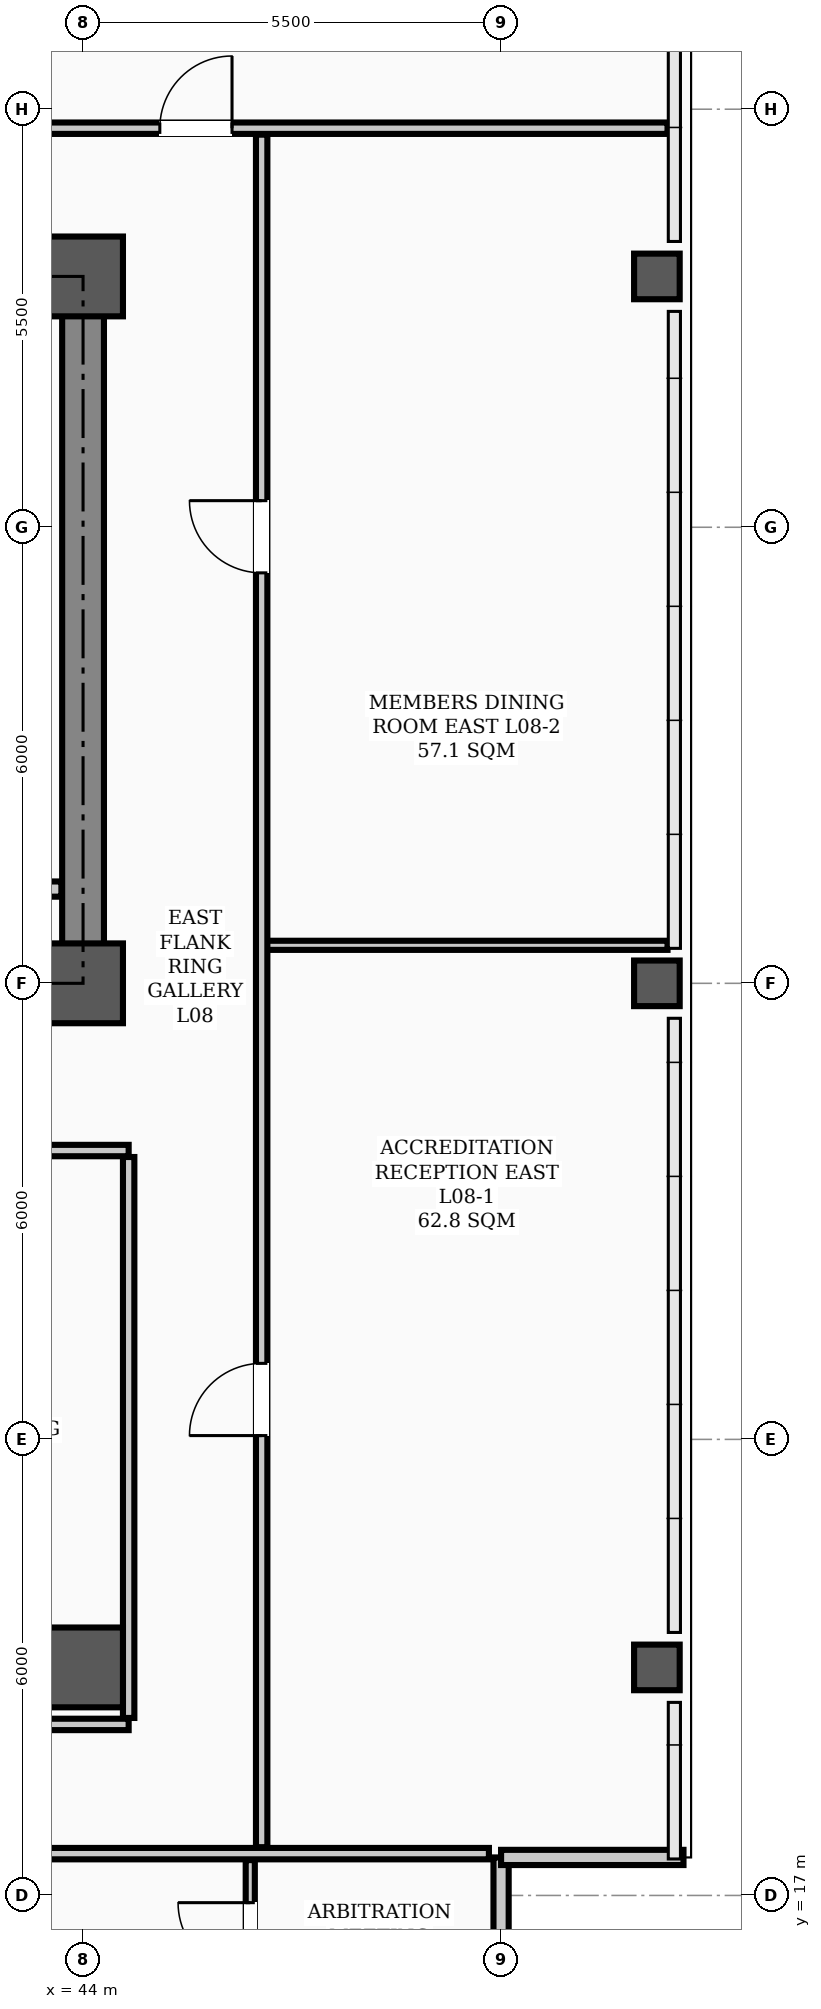
"""IFC4 building model, lengths in metres.
Left out: names, types, materials, properties, quantities, classifications, styles, units other than length and angle.
Written with IfcOpenShell. Run it as: python <this file> out.ifc"""

import sys

from ifc_helpers import new_model, si_unit, direction, frame, frame_2d, origin, origin_2d, place, context, subcontext, project, spatial, rectangle, hollow_rectangle, extrude, element, fill, save


model = new_model("IFC4")
c1 = context("Model", 3, precision=1e-05, world=origin(), true_north=direction((0.0, 1.0)))
c2 = subcontext(c1, "Body", "Model", "MODEL_VIEW")
j1 = project(units=[si_unit("LENGTHUNIT", "METRE"), si_unit("PLANEANGLEUNIT", "RADIAN")], contexts=[c1])
p1 = place(None, origin())
s1 = spatial("IfcSite", under=j1, at=p1, CompositionType="ELEMENT")
p2 = place(p1, origin())
s2 = spatial("IfcBuilding", under=s1, at=p2, CompositionType="ELEMENT")
p3 = place(p2, frame((0.0, 0.0, 34.3)))
s3 = spatial("IfcBuildingStorey", under=s2, at=p3, CompositionType="ELEMENT", Elevation=34.3)
for number, where, z_axis, x_axis in (
    (1, (44.0, 29.0, 0.0), (0.0, 0.0, 1.0), (1.0, 0.0, 0.0)),
    (2, (44.0, 38.3, 0.0), (0.0, 0.0, 1.0), (1.0, 0.0, 0.0)),
    (3, (44.0, 20.0, 0.0), (0.0, 0.0, 1.0), (1.0, 0.0, 0.0)),
):
    element("IfcColumn", number, at=place(p3, frame(where, z_axis=z_axis, x_axis=x_axis)), inside=s3, PredefinedType="COLUMN", context=c2, shape_type="SweptSolid", body=[
        extrude(hollow_rectangle(XDim=1.05, YDim=1.05, WallThickness=0.038, InnerFilletRadius=0.019, OuterFilletRadius=0.057, at=origin_2d()), origin(), (0.0, 0.0, 1.0), 3.9),
    ])
for number, where, z_axis, x_axis in (
    (4, (51.55, 20.0, 0.0), (0.0, 0.0, 1.0), (1.0, 0.0, 0.0)),
    (5, (51.55, 29.0, 0.0), (0.0, 0.0, 1.0), (1.0, 0.0, 0.0)),
    (6, (51.55, 38.3, 0.0), (0.0, 0.0, 1.0), (1.0, 0.0, 0.0)),
):
    element("IfcColumn", number, at=place(p3, frame(where, z_axis=z_axis, x_axis=x_axis)), inside=s3, PredefinedType="COLUMN", context=c2, shape_type="SweptSolid", body=[
        extrude(hollow_rectangle(XDim=0.6, YDim=0.6, WallThickness=0.026, InnerFilletRadius=0.013, OuterFilletRadius=0.039, at=origin_2d()), origin(), (0.0, 0.0, 1.0), 3.9),
    ])
for number, where, z_axis, x_axis in (
    (7, (49.5, 15.1, 0.0), (0.0, 0.0, 1.0), (0.0, 1.0, 0.0)),
    (8, (49.5, 17.5, 0.0), (0.0, 0.0, 1.0), (1.0, 0.0, 0.0)),
):
    element("IfcWall", number, at=place(p3, frame(where, z_axis=z_axis, x_axis=x_axis)), inside=s3, PredefinedType="PARAPET", context=c2, shape_type="SweptSolid", body=[
        extrude(rectangle(XDim=2.4, YDim=0.2, at=frame_2d((1.2, 0.0))), origin(), (0.0, 0.0, 1.0), 1.2),
    ])
p4 = place(p3, frame((13.5, 29.0, 0.0), z_axis=(0.0, 0.0, 1.0), x_axis=(1.0, 0.0, 0.0)))
e9 = element("IfcWall", 9, at=p4, inside=s3, PredefinedType="SHEAR", context=c2, shape_type="SweptSolid", body=[
    extrude(rectangle(XDim=30.5, YDim=0.55, at=frame_2d((15.25, 0.0))), origin(), (0.0, 0.0, 1.0), 3.72),
])
p5 = place(p4, frame((1.75, 0.0, 0.0)))
e10 = element("IfcOpeningElement", 10, at=p5, cuts=e9, PredefinedType="OPENING", context=c2, shape_type="SweptSolid", body=[
    extrude(rectangle(XDim=1.1, YDim=2.08, at=frame_2d((0.55, 1.04))), frame((0.0, 0.285, 0.0), z_axis=(0.0, -1.0, 0.0), x_axis=(1.0, 0.0, 0.0)), (0.0, 0.0, 1.0), 0.57),
])
p6 = place(p4, frame((26.7, 0.0, 0.0)))
e11 = element("IfcOpeningElement", 11, at=p6, cuts=e9, PredefinedType="OPENING", context=c2, shape_type="SweptSolid", body=[
    extrude(rectangle(XDim=1.1, YDim=2.08, at=frame_2d((0.55, 1.04))), frame((0.0, 0.285, 0.0), z_axis=(0.0, -1.0, 0.0), x_axis=(1.0, 0.0, 0.0)), (0.0, 0.0, 1.0), 0.57),
])
p7 = place(p4, frame((6.8, 0.0, 0.0)))
e12 = element("IfcOpeningElement", 12, at=p7, cuts=e9, PredefinedType="OPENING", context=c2, shape_type="SweptSolid", body=[
    extrude(rectangle(XDim=1.1, YDim=2.08, at=frame_2d((0.55, 1.04))), frame((0.0, 0.285, 0.0), z_axis=(0.0, -1.0, 0.0), x_axis=(1.0, 0.0, 0.0)), (0.0, 0.0, 1.0), 0.57),
])
p8 = place(p4, frame((13.2, 0.0, 0.0)))
e13 = element("IfcOpeningElement", 13, at=p8, cuts=e9, PredefinedType="OPENING", context=c2, shape_type="SweptSolid", body=[
    extrude(rectangle(XDim=1.6, YDim=2.08, at=frame_2d((0.8, 1.04))), frame((0.0, 0.285, 0.0), z_axis=(0.0, -1.0, 0.0), x_axis=(1.0, 0.0, 0.0)), (0.0, 0.0, 1.0), 0.57),
])
p9 = place(p4, frame((19.53, 0.0, 0.0)))
e14 = element("IfcOpeningElement", 14, at=p9, cuts=e9, PredefinedType="OPENING", context=c2, shape_type="SweptSolid", body=[
    extrude(rectangle(XDim=0.9, YDim=2.08, at=frame_2d((0.45, 1.04))), frame((0.0, 0.285, 0.0), z_axis=(0.0, -1.0, 0.0), x_axis=(1.0, 0.0, 0.0)), (0.0, 0.0, 1.0), 0.57),
])
p10 = place(p4, frame((21.57, 0.0, 0.0)))
e15 = element("IfcOpeningElement", 15, at=p10, cuts=e9, PredefinedType="OPENING", context=c2, shape_type="SweptSolid", body=[
    extrude(rectangle(XDim=0.9, YDim=2.08, at=frame_2d((0.45, 1.04))), frame((0.0, 0.285, 0.0), z_axis=(0.0, -1.0, 0.0), x_axis=(1.0, 0.0, 0.0)), (0.0, 0.0, 1.0), 0.57),
])
p11 = place(p3, frame((13.5, 38.3, 0.0), z_axis=(0.0, 0.0, 1.0), x_axis=(1.0, 0.0, 0.0)))
e16 = element("IfcWall", 16, at=p11, inside=s3, PredefinedType="SHEAR", context=c2, shape_type="SweptSolid", body=[
    extrude(rectangle(XDim=30.5, YDim=0.55, at=frame_2d((15.25, 0.0))), origin(), (0.0, 0.0, 1.0), 3.72),
])
p12 = place(p3, frame((44.0, 29.35, 0.0), z_axis=(0.0, 0.0, 1.0), x_axis=(0.0, 1.0, 0.0)))
e17 = element("IfcWall", 17, at=p12, inside=s3, PredefinedType="SHEAR", context=c2, shape_type="SweptSolid", body=[
    extrude(rectangle(XDim=8.6, YDim=0.55, at=frame_2d((4.3, 0.0))), origin(), (0.0, 0.0, 1.0), 3.72),
])
p13 = place(p3, frame((42.4, 30.24, 0.0), z_axis=(0.0, 0.0, 1.0), x_axis=(1.0, 0.0, 0.0)))
e18 = element("IfcWall", 18, at=p13, inside=s3, PredefinedType="STANDARD", context=c2, shape_type="SweptSolid", body=[
    extrude(rectangle(XDim=1.315, YDim=0.2, at=frame_2d((0.658, 0.0))), origin(), (0.0, 0.0, 1.0), 3.1),
])
p14 = place(p3, frame((12.9, 26.8, 0.0), z_axis=(0.0, 0.0, 1.0), x_axis=(1.0, 0.0, 0.0)))
e19 = element("IfcWall", 19, at=p14, inside=s3, PredefinedType="PARTITIONING", context=c2, shape_type="SweptSolid", body=[
    extrude(rectangle(XDim=31.7, YDim=0.15, at=frame_2d((15.85, 0.0))), origin(), (0.0, 0.0, 1.0), 3.1),
])
p15 = place(p14, frame((13.6, 0.0, 0.0)))
e20 = element("IfcOpeningElement", 20, at=p15, cuts=e19, PredefinedType="OPENING", context=c2, shape_type="SweptSolid", body=[
    extrude(rectangle(XDim=1.6, YDim=2.08, at=frame_2d((0.8, 1.04))), frame((0.0, 0.085, 0.0), z_axis=(0.0, -1.0, 0.0), x_axis=(1.0, 0.0, 0.0)), (0.0, 0.0, 1.0), 0.17),
])
p16 = place(p14, frame((2.875, 0.0, 0.0)))
e21 = element("IfcOpeningElement", 21, at=p16, cuts=e19, PredefinedType="OPENING", context=c2, shape_type="SweptSolid", body=[
    extrude(rectangle(XDim=0.95, YDim=2.08, at=frame_2d((0.475, 1.04))), frame((0.0, 0.085, 0.0), z_axis=(0.0, -1.0, 0.0), x_axis=(1.0, 0.0, 0.0)), (0.0, 0.0, 1.0), 0.17),
])
p17 = place(p14, frame((8.625, 0.0, 0.0)))
e22 = element("IfcOpeningElement", 22, at=p17, cuts=e19, PredefinedType="OPENING", context=c2, shape_type="SweptSolid", body=[
    extrude(rectangle(XDim=0.95, YDim=2.08, at=frame_2d((0.475, 1.04))), frame((0.0, 0.085, 0.0), z_axis=(0.0, -1.0, 0.0), x_axis=(1.0, 0.0, 0.0)), (0.0, 0.0, 1.0), 0.17),
])
p18 = place(p14, frame((16.075, 0.0, 0.0)))
e23 = element("IfcOpeningElement", 23, at=p18, cuts=e19, PredefinedType="OPENING", context=c2, shape_type="SweptSolid", body=[
    extrude(rectangle(XDim=0.95, YDim=2.08, at=frame_2d((0.475, 1.04))), frame((0.0, 0.085, 0.0), z_axis=(0.0, -1.0, 0.0), x_axis=(1.0, 0.0, 0.0)), (0.0, 0.0, 1.0), 0.17),
])
p19 = place(p14, frame((21.875, 0.0, 0.0)))
e24 = element("IfcOpeningElement", 24, at=p19, cuts=e19, PredefinedType="OPENING", context=c2, shape_type="SweptSolid", body=[
    extrude(rectangle(XDim=0.95, YDim=2.08, at=frame_2d((0.475, 1.04))), frame((0.0, 0.085, 0.0), z_axis=(0.0, -1.0, 0.0), x_axis=(1.0, 0.0, 0.0)), (0.0, 0.0, 1.0), 0.17),
])
p20 = place(p14, frame((29.025, 0.0, 0.0)))
e25 = element("IfcOpeningElement", 25, at=p20, cuts=e19, PredefinedType="OPENING", context=c2, shape_type="SweptSolid", body=[
    extrude(rectangle(XDim=0.95, YDim=2.08, at=frame_2d((0.475, 1.04))), frame((0.0, 0.085, 0.0), z_axis=(0.0, -1.0, 0.0), x_axis=(1.0, 0.0, 0.0)), (0.0, 0.0, 1.0), 0.17),
])
p21 = place(p3, frame((4.66, 17.55, 0.0), z_axis=(0.0, 0.0, 1.0), x_axis=(1.0, 0.0, 0.0)))
e26 = element("IfcWall", 26, at=p21, inside=s3, PredefinedType="PARTITIONING", context=c2, shape_type="SweptSolid", body=[
    extrude(rectangle(XDim=44.68, YDim=0.15, at=frame_2d((22.34, 0.0))), origin(), (0.0, 0.0, 1.0), 3.1),
])
p22 = place(p21, frame((7.34, 0.0, 0.0)))
e27 = element("IfcOpeningElement", 27, at=p22, cuts=e26, PredefinedType="OPENING", context=c2, shape_type="SweptSolid", body=[
    extrude(rectangle(XDim=0.95, YDim=2.08, at=frame_2d((0.475, 1.04))), frame((0.0, 0.085, 0.0), z_axis=(0.0, -1.0, 0.0), x_axis=(1.0, 0.0, 0.0)), (0.0, 0.0, 1.0), 0.17),
])
p23 = place(p21, frame((12.465, 0.0, 0.0)))
e28 = element("IfcOpeningElement", 28, at=p23, cuts=e26, PredefinedType="OPENING", context=c2, shape_type="SweptSolid", body=[
    extrude(rectangle(XDim=0.95, YDim=2.08, at=frame_2d((0.475, 1.04))), frame((0.0, 0.085, 0.0), z_axis=(0.0, -1.0, 0.0), x_axis=(1.0, 0.0, 0.0)), (0.0, 0.0, 1.0), 0.17),
])
p24 = place(p21, frame((29.265, 0.0, 0.0)))
e29 = element("IfcOpeningElement", 29, at=p24, cuts=e26, PredefinedType="OPENING", context=c2, shape_type="SweptSolid", body=[
    extrude(rectangle(XDim=0.95, YDim=2.08, at=frame_2d((0.475, 1.04))), frame((0.0, 0.085, 0.0), z_axis=(0.0, -1.0, 0.0), x_axis=(1.0, 0.0, 0.0)), (0.0, 0.0, 1.0), 0.17),
])
p25 = place(p21, frame((37.265, 0.0, 0.0)))
e30 = element("IfcOpeningElement", 30, at=p25, cuts=e26, PredefinedType="OPENING", context=c2, shape_type="SweptSolid", body=[
    extrude(rectangle(XDim=0.95, YDim=2.08, at=frame_2d((0.475, 1.04))), frame((0.0, 0.085, 0.0), z_axis=(0.0, -1.0, 0.0), x_axis=(1.0, 0.0, 0.0)), (0.0, 0.0, 1.0), 0.17),
])
p26 = place(p3, frame((28.4, 19.25, 0.0), z_axis=(0.0, 0.0, 1.0), x_axis=(1.0, 0.0, 0.0)))
e31 = element("IfcWall", 31, at=p26, inside=s3, PredefinedType="PARTITIONING", context=c2, shape_type="SweptSolid", body=[
    extrude(rectangle(XDim=16.2, YDim=0.15, at=frame_2d((8.1, 0.0))), origin(), (0.0, 0.0, 1.0), 3.1),
])
p27 = place(p3, frame((46.35, 29.5, 0.0), z_axis=(0.0, 0.0, 1.0), x_axis=(1.0, 0.0, 0.0)))
e32 = element("IfcWall", 32, at=p27, inside=s3, PredefinedType="PARTITIONING", context=c2, shape_type="SweptSolid", body=[
    extrude(rectangle(XDim=5.34, YDim=0.12, at=frame_2d((2.67, 0.0))), origin(), (0.0, 0.0, 1.0), 3.0),
])
p28 = place(p3, frame((2.31, 40.25, 0.0), z_axis=(0.0, 0.0, 1.0), x_axis=(1.0, 0.0, 0.0)))
e33 = element("IfcWall", 33, at=p28, inside=s3, PredefinedType="PARTITIONING", context=c2, shape_type="SweptSolid", body=[
    extrude(rectangle(XDim=49.38, YDim=0.15, at=frame_2d((24.69, 0.0))), origin(), (0.0, 0.0, 1.0), 3.1),
])
p29 = place(p28, frame((9.23, 0.0, 0.0)))
e34 = element("IfcOpeningElement", 34, at=p29, cuts=e33, PredefinedType="OPENING", context=c2, shape_type="SweptSolid", body=[
    extrude(rectangle(XDim=0.95, YDim=2.08, at=frame_2d((0.475, 1.04))), frame((0.0, 0.085, 0.0), z_axis=(0.0, -1.0, 0.0), x_axis=(1.0, 0.0, 0.0)), (0.0, 0.0, 1.0), 0.17),
])
p30 = place(p28, frame((23.115, 0.0, 0.0)))
e35 = element("IfcOpeningElement", 35, at=p30, cuts=e33, PredefinedType="OPENING", context=c2, shape_type="SweptSolid", body=[
    extrude(rectangle(XDim=0.95, YDim=2.08, at=frame_2d((0.475, 1.04))), frame((0.0, 0.085, 0.0), z_axis=(0.0, -1.0, 0.0), x_axis=(1.0, 0.0, 0.0)), (0.0, 0.0, 1.0), 0.17),
])
p31 = place(p28, frame((31.515, 0.0, 0.0)))
e36 = element("IfcOpeningElement", 36, at=p31, cuts=e33, PredefinedType="OPENING", context=c2, shape_type="SweptSolid", body=[
    extrude(rectangle(XDim=0.95, YDim=2.08, at=frame_2d((0.475, 1.04))), frame((0.0, 0.085, 0.0), z_axis=(0.0, -1.0, 0.0), x_axis=(1.0, 0.0, 0.0)), (0.0, 0.0, 1.0), 0.17),
])
p32 = place(p28, frame((42.7, 0.0, 0.0)))
e37 = element("IfcOpeningElement", 37, at=p32, cuts=e33, PredefinedType="OPENING", context=c2, shape_type="SweptSolid", body=[
    extrude(rectangle(XDim=0.95, YDim=2.08, at=frame_2d((0.475, 1.04))), frame((0.0, 0.085, 0.0), z_axis=(0.0, -1.0, 0.0), x_axis=(1.0, 0.0, 0.0)), (0.0, 0.0, 1.0), 0.17),
])
p33 = place(p3, frame((46.35, 17.635, 0.0), z_axis=(0.0, 0.0, 1.0), x_axis=(0.0, 1.0, 0.0)))
e38 = element("IfcWall", 38, at=p33, inside=s3, PredefinedType="PARTITIONING", context=c2, shape_type="SweptSolid", body=[
    extrude(rectangle(XDim=22.53, YDim=0.15, at=frame_2d((11.265, 0.0))), origin(), (0.0, 0.0, 1.0), 3.0),
])
p34 = place(p33, frame((5.415, 0.0, 0.0)))
e39 = element("IfcOpeningElement", 39, at=p34, cuts=e38, PredefinedType="OPENING", context=c2, shape_type="SweptSolid", body=[
    extrude(rectangle(XDim=0.95, YDim=2.08, at=frame_2d((0.475, 1.04))), frame((0.0, 0.085, 0.0), z_axis=(0.0, -1.0, 0.0), x_axis=(1.0, 0.0, 0.0)), (0.0, 0.0, 1.0), 0.17),
])
p35 = place(p33, frame((16.765, 0.0, 0.0)))
e40 = element("IfcOpeningElement", 40, at=p35, cuts=e38, PredefinedType="OPENING", context=c2, shape_type="SweptSolid", body=[
    extrude(rectangle(XDim=0.95, YDim=2.08, at=frame_2d((0.475, 1.04))), frame((0.0, 0.085, 0.0), z_axis=(0.0, -1.0, 0.0), x_axis=(1.0, 0.0, 0.0)), (0.0, 0.0, 1.0), 0.17),
])
p36 = place(p3, frame((44.6, 19.335, 0.0), z_axis=(0.0, 0.0, 1.0), x_axis=(0.0, 1.0, 0.0)))
e41 = element("IfcWall", 41, at=p36, inside=s3, PredefinedType="PARTITIONING", context=c2, shape_type="SweptSolid", body=[
    extrude(rectangle(XDim=7.38, YDim=0.15, at=frame_2d((3.69, 0.0))), origin(), (0.0, 0.0, 1.0), 3.0),
])
p37 = place(p3, frame((46.2, 15.31, 0.0), z_axis=(0.0, 0.0, 1.0), x_axis=(0.0, 1.0, 0.0)))
e42 = element("IfcWall", 42, at=p37, inside=s3, PredefinedType="PARTITIONING", context=c2, shape_type="SweptSolid", body=[
    extrude(rectangle(XDim=2.155, YDim=0.12, at=frame_2d((1.078, 0.0))), origin(), (0.0, 0.0, 1.0), 3.72),
])
p38 = place(p37, frame((0.645, 0.0, 0.0)))
e43 = element("IfcOpeningElement", 43, at=p38, cuts=e42, PredefinedType="OPENING", context=c2, shape_type="SweptSolid", body=[
    extrude(rectangle(XDim=0.95, YDim=2.08, at=frame_2d((0.475, 1.04))), frame((0.0, 0.07, 0.0), z_axis=(0.0, -1.0, 0.0), x_axis=(1.0, 0.0, 0.0)), (0.0, 0.0, 1.0), 0.14),
])
p39 = place(p38, origin())
e44 = element("IfcDoor", 44, at=p39, inside=s3, OperationType="SINGLE_SWING_RIGHT", PredefinedType="DOOR", context=c2, shape_type="SweptSolid", body=[
    extrude(rectangle(XDim=0.95, YDim=2.08, at=frame_2d((0.475, 1.04))), frame((0.0, 0.025, 0.0), z_axis=(0.0, -1.0, 0.0), x_axis=(1.0, 0.0, 0.0)), (0.0, 0.0, 1.0), 0.05),
])
fill(e43, e44)
p40 = place(p34, origin())
e45 = element("IfcDoor", 45, at=p40, inside=s3, OperationType="SINGLE_SWING_LEFT", PredefinedType="DOOR", context=c2, shape_type="SweptSolid", body=[
    extrude(rectangle(XDim=0.95, YDim=2.08, at=frame_2d((0.475, 1.04))), frame((0.0, 0.025, 0.0), z_axis=(0.0, -1.0, 0.0), x_axis=(1.0, 0.0, 0.0)), (0.0, 0.0, 1.0), 0.05),
])
fill(e39, e45)
p41 = place(p35, origin())
e46 = element("IfcDoor", 46, at=p41, inside=s3, OperationType="SINGLE_SWING_RIGHT", PredefinedType="DOOR", context=c2, shape_type="SweptSolid", body=[
    extrude(rectangle(XDim=0.95, YDim=2.08, at=frame_2d((0.475, 1.04))), frame((0.0, 0.025, 0.0), z_axis=(0.0, -1.0, 0.0), x_axis=(1.0, 0.0, 0.0)), (0.0, 0.0, 1.0), 0.05),
])
fill(e40, e46)
p42 = place(p32, origin())
e47 = element("IfcDoor", 47, at=p42, inside=s3, OperationType="SINGLE_SWING_RIGHT", PredefinedType="DOOR", context=c2, shape_type="SweptSolid", body=[
    extrude(rectangle(XDim=0.95, YDim=2.08, at=frame_2d((0.475, 1.04))), frame((0.0, 0.025, 0.0), z_axis=(0.0, -1.0, 0.0), x_axis=(1.0, 0.0, 0.0)), (0.0, 0.0, 1.0), 0.05),
])
fill(e37, e47)
save(model, sys.argv[1])
